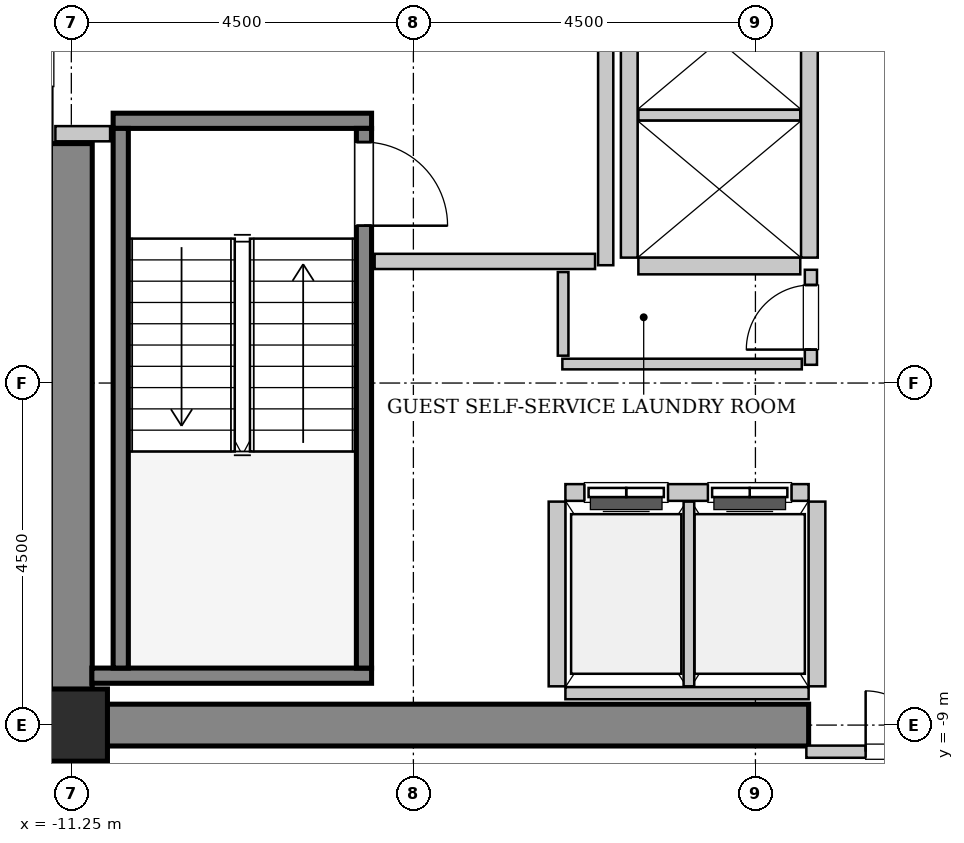
"""IFC4 building model, lengths in metres.
Left out: names, types, materials, properties, quantities, classifications, styles, units other than length and angle.
Written with IfcOpenShell. Run it as: python <this file> out.ifc"""

import sys

from ifc_helpers import new_model, si_unit, direction, frame, frame_2d, origin, origin_2d, place, context, subcontext, project, spatial, rectangle, hollow_rectangle, extrude, source, transform, mapped, element, fill, save


model = new_model("IFC4")
c1 = context("Model", 3, precision=1e-05, world=origin(), true_north=direction((0.0, 1.0)))
c2 = subcontext(c1, "Body", "Model", "MODEL_VIEW")
j1 = project(units=[si_unit("LENGTHUNIT", "METRE"), si_unit("PLANEANGLEUNIT", "RADIAN")], contexts=[c1])
p1 = place(None, origin())
s1 = spatial("IfcSite", under=j1, at=p1, CompositionType="ELEMENT")
p2 = place(p1, origin())
s2 = spatial("IfcBuilding", under=s1, at=p2, CompositionType="ELEMENT")
p3 = place(p2, frame((0.0, 0.0, 156.4)))
s3 = spatial("IfcBuildingStorey", under=s2, at=p3, CompositionType="ELEMENT", Elevation=156.4)
m1 = source(origin(), c2, "Body", "SweptSolid", [
    extrude(rectangle(XDim=9.975, YDim=0.55, at=frame_2d((4.987, 0.0))), origin(), (0.0, 0.0, 1.0), 3.8),
])
p4 = place(p3, frame((-11.525, -9.0, 0.0), z_axis=(0.0, 0.0, 1.0), x_axis=(1.0, 0.0, 0.0)))
e1 = element("IfcWall", 1, at=p4, inside=s3, PredefinedType="SHEAR", context=c2, shape_type="MappedRepresentation", body=[
    mapped(m1, transform((0.0, 0.0, 0.0), x_axis=(1.0, 0.0, 0.0), y_axis=(0.0, 1.0, 0.0), z_axis=(0.0, 0.0, 1.0), scale=1.0)),
])
m2 = source(origin(), c2, "Body", "SweptSolid", [
    extrude(rectangle(XDim=7.375, YDim=0.55, at=frame_2d((3.688, 0.0))), origin(), (0.0, 0.0, 1.0), 3.8),
])
p5 = place(p3, frame((-11.25, -8.725, 0.0), z_axis=(0.0, 0.0, 1.0), x_axis=(0.0, 1.0, 0.0)))
e2 = element("IfcWall", 2, at=p5, inside=s3, PredefinedType="SHEAR", context=c2, shape_type="MappedRepresentation", body=[
    mapped(m2, transform((0.0, 0.0, 0.0), x_axis=(1.0, 0.0, 0.0), y_axis=(0.0, 1.0, 0.0), z_axis=(0.0, 0.0, 1.0), scale=1.0)),
])
m3 = source(origin(), c2, "Body", "SweptSolid", [
    extrude(hollow_rectangle(XDim=0.95, YDim=0.95, WallThickness=0.045, InnerFilletRadius=0.045, OuterFilletRadius=0.09, at=origin_2d()), origin(), (0.0, 0.0, 1.0), 3.8),
])
p6 = place(p3, frame((-11.25, -9.0, 0.0), z_axis=(0.0, 0.0, 1.0), x_axis=(1.0, 0.0, 0.0)))
e3 = element("IfcColumn", 3, at=p6, inside=s3, PredefinedType="COLUMN", context=c2, shape_type="MappedRepresentation", body=[
    mapped(m3, transform((0.0, 0.0, 0.0), x_axis=(1.0, 0.0, 0.0), y_axis=(0.0, 1.0, 0.0), z_axis=(0.0, 0.0, 1.0), scale=1.0)),
])
m4 = source(origin(), c2, "Body", "SweptSolid", [
    extrude(rectangle(XDim=3.4, YDim=0.2, at=frame_2d((1.7, 0.0))), origin(), (0.0, 0.0, 1.0), 3.8),
])
p7 = place(p3, frame((-10.7, -1.05, 0.0), z_axis=(0.0, 0.0, 1.0), x_axis=(1.0, 0.0, 0.0)))
e4 = element("IfcWall", 4, at=p7, inside=s3, PredefinedType="SOLIDWALL", context=c2, shape_type="MappedRepresentation", body=[
    mapped(m4, transform((0.0, 0.0, 0.0), x_axis=(1.0, 0.0, 0.0), y_axis=(0.0, 1.0, 0.0), z_axis=(0.0, 0.0, 1.0), scale=1.0)),
])
m5 = source(origin(), c2, "Body", "SweptSolid", [
    extrude(rectangle(XDim=3.68, YDim=0.2, at=frame_2d((1.84, 0.0))), origin(), (0.0, 0.0, 1.0), 3.8),
])
p8 = place(p3, frame((-10.98, -8.35, 0.0), z_axis=(0.0, 0.0, 1.0), x_axis=(1.0, 0.0, 0.0)))
e5 = element("IfcWall", 5, at=p8, inside=s3, PredefinedType="SOLIDWALL", context=c2, shape_type="MappedRepresentation", body=[
    mapped(m5, transform((0.0, 0.0, 0.0), x_axis=(1.0, 0.0, 0.0), y_axis=(0.0, 1.0, 0.0), z_axis=(0.0, 0.0, 1.0), scale=1.0)),
])
m6 = source(origin(), c2, "Body", "SweptSolid", [
    extrude(rectangle(XDim=7.1, YDim=0.2, at=frame_2d((3.55, 0.0))), origin(), (0.0, 0.0, 1.0), 3.8),
])
p9 = place(p3, frame((-10.6, -1.15, 0.0), z_axis=(0.0, 0.0, 1.0), x_axis=(0.0, -1.0, 0.0)))
e6 = element("IfcWall", 6, at=p9, inside=s3, PredefinedType="SOLIDWALL", context=c2, shape_type="MappedRepresentation", body=[
    mapped(m6, transform((0.0, 0.0, 0.0), x_axis=(1.0, 0.0, 0.0), y_axis=(0.0, 1.0, 0.0), z_axis=(0.0, 0.0, 1.0), scale=1.0)),
])
p10 = place(p3, frame((-7.4, -1.15, 0.0), z_axis=(0.0, 0.0, 1.0), x_axis=(0.0, -1.0, 0.0)))
e7 = element("IfcWall", 7, at=p10, inside=s3, PredefinedType="SOLIDWALL", context=c2, shape_type="MappedRepresentation", body=[
    mapped(m6, transform((0.0, 0.0, 0.0), x_axis=(1.0, 0.0, 0.0), y_axis=(0.0, 1.0, 0.0), z_axis=(0.0, 0.0, 1.0), scale=1.0)),
])
p11 = place(p10, frame((0.18, 0.0, 0.0)))
e8 = element("IfcOpeningElement", 8, at=p11, cuts=e7, PredefinedType="OPENING", context=c2, shape_type="SweptSolid", body=[
    extrude(rectangle(XDim=1.1, YDim=2.15, at=frame_2d((0.55, 1.075))), frame((0.0, 0.11, 0.0), z_axis=(0.0, -1.0, 0.0), x_axis=(1.0, 0.0, 0.0)), (0.0, 0.0, 1.0), 0.22),
])
m7 = source(origin(), c2, "Body", "SweptSolid", [
    extrude(rectangle(XDim=3.2, YDim=0.22, at=frame_2d((1.6, 0.0))), origin(), (0.0, 0.0, 1.0), 3.535),
])
p12 = place(p3, frame((-1.55, -5.94, 0.0), z_axis=(0.0, 0.0, 1.0), x_axis=(-1.0, 0.0, 0.0)))
e9 = element("IfcWall", 9, at=p12, inside=s3, PredefinedType="SOLIDWALL", context=c2, shape_type="MappedRepresentation", body=[
    mapped(m7, transform((0.0, 0.0, 0.0), x_axis=(1.0, 0.0, 0.0), y_axis=(0.0, 1.0, 0.0), z_axis=(0.0, 0.0, 1.0), scale=1.0)),
])
p13 = place(p12, frame((1.85, 0.0, 0.0)))
e10 = element("IfcOpeningElement", 10, at=p13, cuts=e9, PredefinedType="OPENING", context=c2, shape_type="SweptSolid", body=[
    extrude(rectangle(XDim=1.1, YDim=2.2, at=frame_2d((0.55, 1.1))), frame((0.0, 0.12, 0.0), z_axis=(0.0, -1.0, 0.0), x_axis=(1.0, 0.0, 0.0)), (0.0, 0.0, 1.0), 0.24),
])
p14 = place(p12, frame((0.225, 0.0, 0.0)))
e11 = element("IfcOpeningElement", 11, at=p14, cuts=e9, PredefinedType="OPENING", context=c2, shape_type="SweptSolid", body=[
    extrude(rectangle(XDim=1.1, YDim=2.2, at=frame_2d((0.55, 1.1))), frame((0.0, 0.12, 0.0), z_axis=(0.0, -1.0, 0.0), x_axis=(1.0, 0.0, 0.0)), (0.0, 0.0, 1.0), 0.24),
])
m8 = source(origin(), c2, "Body", "SweptSolid", [
    extrude(rectangle(XDim=3.2, YDim=0.16, at=frame_2d((1.6, 0.0))), origin(), (0.0, 0.0, 1.0), 2.425),
])
p15 = place(p3, frame((-4.75, -8.58, 0.0), z_axis=(0.0, 0.0, 1.0), x_axis=(1.0, 0.0, 0.0)))
e12 = element("IfcWall", 12, at=p15, inside=s3, PredefinedType="PARTITIONING", context=c2, shape_type="MappedRepresentation", body=[
    mapped(m8, transform((0.0, 0.0, 0.0), x_axis=(1.0, 0.0, 0.0), y_axis=(0.0, 1.0, 0.0), z_axis=(0.0, 0.0, 1.0), scale=1.0)),
])
m9 = source(origin(), c2, "Body", "SweptSolid", [
    extrude(rectangle(XDim=2.43, YDim=0.22, at=frame_2d((1.215, 0.0))), origin(), (0.0, 0.0, 1.0), 3.535),
])
p16 = place(p3, frame((-4.86, -6.06, 0.0), z_axis=(0.0, 0.0, 1.0), x_axis=(0.0, -1.0, 0.0)))
e13 = element("IfcWall", 13, at=p16, inside=s3, PredefinedType="SOLIDWALL", context=c2, shape_type="MappedRepresentation", body=[
    mapped(m9, transform((0.0, 0.0, 0.0), x_axis=(1.0, 0.0, 0.0), y_axis=(0.0, 1.0, 0.0), z_axis=(0.0, 0.0, 1.0), scale=1.0)),
])
m10 = source(origin(), c2, "Body", "SweptSolid", [
    extrude(rectangle(XDim=2.43, YDim=0.14, at=frame_2d((1.215, 0.0))), origin(), (0.0, 0.0, 1.0), 3.535),
])
p17 = place(p3, frame((-3.125, -8.49, 0.0), z_axis=(0.0, 0.0, 1.0), x_axis=(0.0, 1.0, 0.0)))
e14 = element("IfcWall", 14, at=p17, inside=s3, PredefinedType="PARTITIONING", context=c2, shape_type="MappedRepresentation", body=[
    mapped(m10, transform((0.0, 0.0, 0.0), x_axis=(1.0, 0.0, 0.0), y_axis=(0.0, 1.0, 0.0), z_axis=(0.0, 0.0, 1.0), scale=1.0)),
])
p18 = place(p3, frame((-1.44, -8.49, 0.0), z_axis=(0.0, 0.0, 1.0), x_axis=(0.0, 1.0, 0.0)))
e15 = element("IfcWall", 15, at=p18, inside=s3, PredefinedType="SOLIDWALL", context=c2, shape_type="MappedRepresentation", body=[
    mapped(m9, transform((0.0, 0.0, 0.0), x_axis=(1.0, 0.0, 0.0), y_axis=(0.0, 1.0, 0.0), z_axis=(0.0, 0.0, 1.0), scale=1.0)),
])
m11 = source(origin(), c2, "Body", "SweptSolid", [
    extrude(rectangle(XDim=5.7, YDim=0.22, at=frame_2d((2.85, 0.0))), origin(), (0.0, 0.0, 1.0), 3.535),
])
for number, where, z_axis, x_axis in (
    (16, (-1.54, -2.85, 0.0), (0.0, 0.0, 1.0), (0.0, 1.0, 0.0)),
    (17, (-3.91, 2.85, 0.0), (0.0, 0.0, 1.0), (0.0, -1.0, 0.0)),
):
    element("IfcWall", number, at=place(p3, frame(where, z_axis=z_axis, x_axis=x_axis)), inside=s3, PredefinedType="SOLIDWALL", context=c2, shape_type="MappedRepresentation", body=[
        mapped(m11, transform((0.0, 0.0, 0.0), x_axis=(1.0, 0.0, 0.0), y_axis=(0.0, 1.0, 0.0), z_axis=(0.0, 0.0, 1.0), scale=1.0)),
    ])
m12 = source(origin(), c2, "Body", "SweptSolid", [
    extrude(rectangle(XDim=2.13, YDim=0.22, at=frame_2d((1.065, 0.0))), origin(), (0.0, 0.0, 1.0), 3.535),
])
p19 = place(p3, frame((-3.79, -2.96, 0.0), z_axis=(0.0, 0.0, 1.0), x_axis=(1.0, 0.0, 0.0)))
e18 = element("IfcWall", 18, at=p19, inside=s3, PredefinedType="SOLIDWALL", context=c2, shape_type="MappedRepresentation", body=[
    mapped(m12, transform((0.0, 0.0, 0.0), x_axis=(1.0, 0.0, 0.0), y_axis=(0.0, 1.0, 0.0), z_axis=(0.0, 0.0, 1.0), scale=1.0)),
])
m13 = source(origin(), c2, "Body", "SweptSolid", [
    extrude(rectangle(XDim=2.13, YDim=0.14, at=frame_2d((1.065, 0.0))), origin(), (0.0, 0.0, 1.0), 3.535),
])
p20 = place(p3, frame((-3.79, -0.975, 0.0), z_axis=(0.0, 0.0, 1.0), x_axis=(1.0, 0.0, 0.0)))
e19 = element("IfcWall", 19, at=p20, inside=s3, PredefinedType="PARTITIONING", context=c2, shape_type="MappedRepresentation", body=[
    mapped(m13, transform((0.0, 0.0, 0.0), x_axis=(1.0, 0.0, 0.0), y_axis=(0.0, 1.0, 0.0), z_axis=(0.0, 0.0, 1.0), scale=1.0)),
])
m14 = source(origin(), c2, "Body", "SweptSolid", [
    extrude(rectangle(XDim=5.9, YDim=0.2, at=frame_2d((2.95, 0.0))), origin(), (0.0, 0.0, 1.0), 3.535),
])
p21 = place(p3, frame((-4.22, -2.95, 0.0), z_axis=(0.0, 0.0, 1.0), x_axis=(0.0, 1.0, 0.0)))
e20 = element("IfcWall", 20, at=p21, inside=s3, PredefinedType="PARTITIONING", context=c2, shape_type="MappedRepresentation", body=[
    mapped(m14, transform((0.0, 0.0, 0.0), x_axis=(1.0, 0.0, 0.0), y_axis=(0.0, 1.0, 0.0), z_axis=(0.0, 0.0, 1.0), scale=1.0)),
])
m15 = source(origin(), c2, "Body", "SweptSolid", [
    extrude(rectangle(XDim=2.9, YDim=0.2, at=frame_2d((1.45, 0.0))), origin(), (0.0, 0.0, 1.0), 3.535),
])
p22 = place(p3, frame((-7.26, -2.9, 0.0), z_axis=(0.0, 0.0, 1.0), x_axis=(1.0, 0.0, 0.0)))
e21 = element("IfcWall", 21, at=p22, inside=s3, PredefinedType="PARTITIONING", context=c2, shape_type="MappedRepresentation", body=[
    mapped(m15, transform((0.0, 0.0, 0.0), x_axis=(1.0, 0.0, 0.0), y_axis=(0.0, 1.0, 0.0), z_axis=(0.0, 0.0, 1.0), scale=1.0)),
])
m16 = source(origin(), c2, "Body", "SweptSolid", [
    extrude(rectangle(XDim=0.72, YDim=0.2, at=frame_2d((0.36, 0.0))), origin(), (0.0, 0.0, 1.0), 3.535),
])
p23 = place(p3, frame((-11.46, -1.22, 0.0), z_axis=(0.0, 0.0, 1.0), x_axis=(1.0, 0.0, 0.0)))
e22 = element("IfcWall", 22, at=p23, inside=s3, PredefinedType="PARTITIONING", context=c2, shape_type="MappedRepresentation", body=[
    mapped(m16, transform((0.0, 0.0, 0.0), x_axis=(1.0, 0.0, 0.0), y_axis=(0.0, 1.0, 0.0), z_axis=(0.0, 0.0, 1.0), scale=1.0)),
])
m17 = source(origin(), c2, "Body", "SweptSolid", [
    extrude(rectangle(XDim=3.16, YDim=0.16, at=frame_2d((1.58, 0.0))), origin(), (0.0, 0.0, 1.0), 2.425),
])
p24 = place(p3, frame((-1.58, -9.35, 0.0), z_axis=(0.0, 0.0, 1.0), x_axis=(1.0, 0.0, 0.0)))
e23 = element("IfcWall", 23, at=p24, inside=s3, PredefinedType="PARTITIONING", context=c2, shape_type="MappedRepresentation", body=[
    mapped(m17, transform((0.0, 0.0, 0.0), x_axis=(1.0, 0.0, 0.0), y_axis=(0.0, 1.0, 0.0), z_axis=(0.0, 0.0, 1.0), scale=1.0)),
])
p25 = place(p24, frame((0.78, 0.0, 0.0)))
e24 = element("IfcOpeningElement", 24, at=p25, cuts=e23, PredefinedType="OPENING", context=c2, shape_type="SweptSolid", body=[
    extrude(rectangle(XDim=1.6, YDim=2.3, at=frame_2d((0.8, 1.15))), frame((0.0, 0.09, 0.0), z_axis=(0.0, -1.0, 0.0), x_axis=(1.0, 0.0, 0.0)), (0.0, 0.0, 1.0), 0.18),
])
m18 = source(origin(), c2, "Body", "SweptSolid", [
    extrude(rectangle(XDim=1.25, YDim=0.16, at=frame_2d((0.625, 0.0))), origin(), (0.0, 0.0, 1.0), 3.535),
])
p26 = place(p3, frame((-1.52, -4.26, 0.0), z_axis=(0.0, 0.0, 1.0), x_axis=(0.0, 1.0, 0.0)))
e25 = element("IfcWall", 25, at=p26, inside=s3, PredefinedType="PARTITIONING", context=c2, shape_type="MappedRepresentation", body=[
    mapped(m18, transform((0.0, 0.0, 0.0), x_axis=(1.0, 0.0, 0.0), y_axis=(0.0, 1.0, 0.0), z_axis=(0.0, 0.0, 1.0), scale=1.0)),
])
p27 = place(p26, frame((0.2, 0.0, 0.0)))
e26 = element("IfcOpeningElement", 26, at=p27, cuts=e25, PredefinedType="OPENING", context=c2, shape_type="SweptSolid", body=[
    extrude(rectangle(XDim=0.85, YDim=2.1, at=frame_2d((0.425, 1.05))), frame((0.0, 0.09, 0.0), z_axis=(0.0, -1.0, 0.0), x_axis=(1.0, 0.0, 0.0)), (0.0, 0.0, 1.0), 0.18),
])
m19 = source(origin(), c2, "Body", "SweptSolid", [
    extrude(rectangle(XDim=3.15, YDim=0.14, at=frame_2d((1.575, 0.0))), origin(), (0.0, 0.0, 1.0), 3.535),
])
p28 = place(p3, frame((-4.79, -4.25, 0.0), z_axis=(0.0, 0.0, 1.0), x_axis=(1.0, 0.0, 0.0)))
e27 = element("IfcWall", 27, at=p28, inside=s3, PredefinedType="PARTITIONING", context=c2, shape_type="MappedRepresentation", body=[
    mapped(m19, transform((0.0, 0.0, 0.0), x_axis=(1.0, 0.0, 0.0), y_axis=(0.0, 1.0, 0.0), z_axis=(0.0, 0.0, 1.0), scale=1.0)),
])
m20 = source(origin(), c2, "Body", "SweptSolid", [
    extrude(rectangle(XDim=1.1, YDim=0.14, at=frame_2d((0.55, 0.0))), origin(), (0.0, 0.0, 1.0), 3.535),
])
p29 = place(p3, frame((-4.78, -4.14, 0.0), z_axis=(0.0, 0.0, 1.0), x_axis=(0.0, 1.0, 0.0)))
e28 = element("IfcWall", 28, at=p29, inside=s3, PredefinedType="PARTITIONING", context=c2, shape_type="MappedRepresentation", body=[
    mapped(m20, transform((0.0, 0.0, 0.0), x_axis=(1.0, 0.0, 0.0), y_axis=(0.0, 1.0, 0.0), z_axis=(0.0, 0.0, 1.0), scale=1.0)),
])
m21 = source(origin(), c2, "Body", "SweptSolid", [
    extrude(rectangle(XDim=1.1, YDim=2.15, at=frame_2d((0.55, 1.075))), frame((0.0, 0.025, 0.0), z_axis=(0.0, -1.0, 0.0), x_axis=(1.0, 0.0, 0.0)), (0.0, 0.0, 1.0), 0.05),
])
p30 = place(p11, origin())
e29 = element("IfcDoor", 29, at=p30, inside=s3, OperationType="SINGLE_SWING_RIGHT", PredefinedType="DOOR", context=c2, shape_type="MappedRepresentation", body=[
    mapped(m21, transform((0.0, 0.0, 0.0), x_axis=(1.0, 0.0, 0.0), y_axis=(0.0, 1.0, 0.0), z_axis=(0.0, 0.0, 1.0), scale=1.0)),
])
fill(e8, e29)
m22 = source(origin(), c2, "Body", "SweptSolid", [
    extrude(rectangle(XDim=1.1, YDim=2.2, at=frame_2d((0.55, 1.1))), frame((0.0, 0.025, 0.0), z_axis=(0.0, -1.0, 0.0), x_axis=(1.0, 0.0, 0.0)), (0.0, 0.0, 1.0), 0.05),
])
p31 = place(p13, origin())
e30 = element("IfcDoor", 30, at=p31, inside=s3, OperationType="DOUBLE_DOOR_SLIDING", PredefinedType="DOOR", context=c2, shape_type="MappedRepresentation", body=[
    mapped(m22, transform((0.0, 0.0, 0.0), x_axis=(1.0, 0.0, 0.0), y_axis=(0.0, 1.0, 0.0), z_axis=(0.0, 0.0, 1.0), scale=1.0)),
])
fill(e10, e30)
p32 = place(p14, origin())
e31 = element("IfcDoor", 31, at=p32, inside=s3, OperationType="DOUBLE_DOOR_SLIDING", PredefinedType="DOOR", context=c2, shape_type="MappedRepresentation", body=[
    mapped(m22, transform((0.0, 0.0, 0.0), x_axis=(1.0, 0.0, 0.0), y_axis=(0.0, 1.0, 0.0), z_axis=(0.0, 0.0, 1.0), scale=1.0)),
])
fill(e11, e31)
m23 = source(origin(), c2, "Body", "SweptSolid", [
    extrude(rectangle(XDim=1.6, YDim=2.3, at=frame_2d((0.8, 1.15))), frame((0.0, 0.025, 0.0), z_axis=(0.0, -1.0, 0.0), x_axis=(1.0, 0.0, 0.0)), (0.0, 0.0, 1.0), 0.05),
])
p33 = place(p25, origin())
e32 = element("IfcDoor", 32, at=p33, inside=s3, OperationType="DOUBLE_DOOR_SINGLE_SWING", PredefinedType="DOOR", context=c2, shape_type="MappedRepresentation", body=[
    mapped(m23, transform((0.0, 0.0, 0.0), x_axis=(1.0, 0.0, 0.0), y_axis=(0.0, 1.0, 0.0), z_axis=(0.0, 0.0, 1.0), scale=1.0)),
])
fill(e24, e32)
m24 = source(origin(), c2, "Body", "SweptSolid", [
    extrude(rectangle(XDim=0.85, YDim=2.1, at=frame_2d((0.425, 1.05))), frame((0.0, 0.025, 0.0), z_axis=(0.0, -1.0, 0.0), x_axis=(1.0, 0.0, 0.0)), (0.0, 0.0, 1.0), 0.05),
])
p34 = place(p27, origin())
e33 = element("IfcDoor", 33, at=p34, inside=s3, OperationType="SINGLE_SWING_LEFT", PredefinedType="DOOR", context=c2, shape_type="MappedRepresentation", body=[
    mapped(m24, transform((0.0, 0.0, 0.0), x_axis=(1.0, 0.0, 0.0), y_axis=(0.0, 1.0, 0.0), z_axis=(0.0, 0.0, 1.0), scale=1.0)),
])
fill(e26, e33)
save(model, sys.argv[1])
